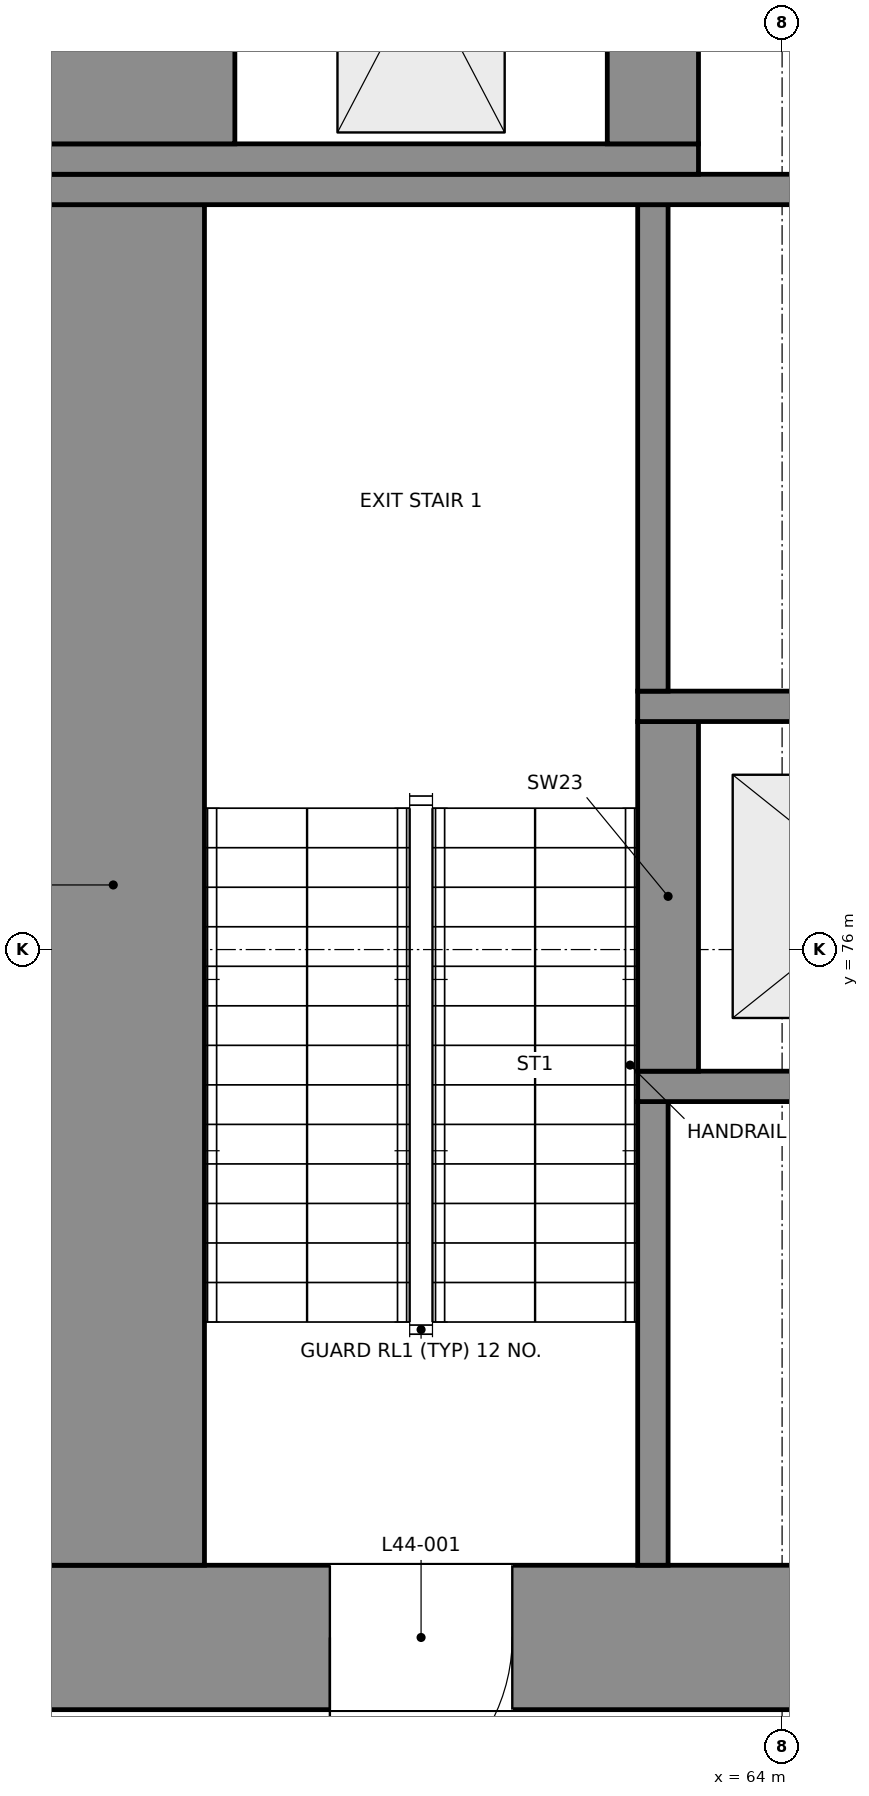
"""IFC4 building model, lengths in metres.
Left out: names, types, materials, properties, quantities, classifications, styles, units other than length and angle.
Written with IfcOpenShell. Run it as: python <this file> out.ifc"""

import sys

from ifc_helpers import new_model, si_unit, direction, frame, frame_2d, origin, place, context, subcontext, project, spatial, rectangle, extrude, element, fill, save


model = new_model("IFC4")
c1 = context("Model", 3, precision=1e-05, world=origin(), true_north=direction((0.0, 1.0)))
c2 = subcontext(c1, "Body", "Model", "MODEL_VIEW")
j1 = project(units=[si_unit("LENGTHUNIT", "METRE"), si_unit("PLANEANGLEUNIT", "RADIAN")], contexts=[c1])
p1 = place(None, origin())
s1 = spatial("IfcSite", under=j1, at=p1, CompositionType="ELEMENT")
p2 = place(p1, origin())
s2 = spatial("IfcBuilding", under=s1, at=p2, CompositionType="ELEMENT")
p3 = place(p2, frame((0.0, 0.0, 191.5)))
s3 = spatial("IfcBuildingStorey", under=s2, at=p3, CompositionType="ELEMENT", Elevation=191.5)
p4 = place(p3, frame((59.0, 71.475, 0.0), z_axis=(0.0, 0.0, 1.0), x_axis=(1.0, 0.0, 0.0)))
e1 = element("IfcWall", 1, at=p4, inside=s3, PredefinedType="SHEAR", context=c2, shape_type="SweptSolid", body=[
    extrude(rectangle(XDim=22.0, YDim=0.95, at=frame_2d((11.0, 0.0))), origin(), (0.0, 0.0, 1.0), 5.0),
])
p5 = place(p4, frame((2.025, 0.0, 0.0)))
e2 = element("IfcOpeningElement", 2, at=p5, cuts=e1, PredefinedType="OPENING", context=c2, shape_type="SweptSolid", body=[
    extrude(rectangle(XDim=1.2, YDim=2.1, at=frame_2d((0.6, 1.05))), frame((0.0, 0.485, 0.0), z_axis=(0.0, -1.0, 0.0), x_axis=(1.0, 0.0, 0.0)), (0.0, 0.0, 1.0), 0.97),
])
p6 = place(p4, frame((18.775, 0.0, 0.0)))
e3 = element("IfcOpeningElement", 3, at=p6, cuts=e1, PredefinedType="OPENING", context=c2, shape_type="SweptSolid", body=[
    extrude(rectangle(XDim=1.2, YDim=2.1, at=frame_2d((0.6, 1.05))), frame((0.0, 0.485, 0.0), z_axis=(0.0, -1.0, 0.0), x_axis=(1.0, 0.0, 0.0)), (0.0, 0.0, 1.0), 0.97),
])
p7 = place(p4, frame((10.0, 0.0, 0.0)))
e4 = element("IfcOpeningElement", 4, at=p7, cuts=e1, PredefinedType="OPENING", context=c2, shape_type="SweptSolid", body=[
    extrude(rectangle(XDim=2.0, YDim=2.1, at=frame_2d((1.0, 1.05))), frame((0.0, 0.485, 0.0), z_axis=(0.0, -1.0, 0.0), x_axis=(1.0, 0.0, 0.0)), (0.0, 0.0, 1.0), 0.97),
])
p8 = place(p3, frame((59.6, 71.95, 0.0), z_axis=(0.0, 0.0, 1.0), x_axis=(0.0, 1.0, 0.0)))
e5 = element("IfcWall", 5, at=p8, inside=s3, PredefinedType="SHEAR", context=c2, shape_type="SweptSolid", body=[
    extrude(rectangle(XDim=8.95, YDim=1.2, at=frame_2d((4.475, 0.0))), origin(), (0.0, 0.0, 1.0), 5.0),
])
p9 = place(p3, frame((63.15, 71.95, 0.0), z_axis=(0.0, 0.0, 1.0), x_axis=(0.0, 1.0, 0.0)))
e6 = element("IfcWall", 6, at=p9, inside=s3, PredefinedType="SHEAR", context=c2, shape_type="SweptSolid", body=[
    extrude(rectangle(XDim=3.05, YDim=0.2, at=frame_2d((1.525, 0.0))), origin(), (0.0, 0.0, 1.0), 5.0),
])
p10 = place(p3, frame((63.05, 75.1, 0.0), z_axis=(0.0, 0.0, 1.0), x_axis=(1.0, 0.0, 0.0)))
e7 = element("IfcWall", 7, at=p10, inside=s3, PredefinedType="SHEAR", context=c2, shape_type="SweptSolid", body=[
    extrude(rectangle(XDim=5.7, YDim=0.2, at=frame_2d((2.85, 0.0))), origin(), (0.0, 0.0, 1.0), 5.0),
])
p11 = place(p3, frame((63.25, 75.2, 0.0), z_axis=(0.0, 0.0, 1.0), x_axis=(0.0, 1.0, 0.0)))
e8 = element("IfcWall", 8, at=p11, inside=s3, PredefinedType="SHEAR", context=c2, shape_type="SweptSolid", body=[
    extrude(rectangle(XDim=2.3, YDim=0.4, at=frame_2d((1.15, 0.0))), origin(), (0.0, 0.0, 1.0), 5.0),
])
p12 = place(p3, frame((63.05, 77.6, 0.0), z_axis=(0.0, 0.0, 1.0), x_axis=(1.0, 0.0, 0.0)))
e9 = element("IfcWall", 9, at=p12, inside=s3, PredefinedType="SHEAR", context=c2, shape_type="SweptSolid", body=[
    extrude(rectangle(XDim=5.7, YDim=0.2, at=frame_2d((2.85, 0.0))), origin(), (0.0, 0.0, 1.0), 5.0),
])
p13 = place(p12, frame((1.075, 0.0, 0.0)))
e10 = element("IfcOpeningElement", 10, at=p13, cuts=e9, PredefinedType="OPENING", context=c2, shape_type="SweptSolid", body=[
    extrude(rectangle(XDim=1.1, YDim=2.1, at=frame_2d((0.55, 1.05))), frame((0.0, 0.11, 0.0), z_axis=(0.0, -1.0, 0.0), x_axis=(1.0, 0.0, 0.0)), (0.0, 0.0, 1.0), 0.22),
])
p14 = place(p12, frame((3.725, 0.0, 0.0)))
e11 = element("IfcOpeningElement", 11, at=p14, cuts=e9, PredefinedType="OPENING", context=c2, shape_type="SweptSolid", body=[
    extrude(rectangle(XDim=1.1, YDim=2.1, at=frame_2d((0.55, 1.05))), frame((0.0, 0.11, 0.0), z_axis=(0.0, -1.0, 0.0), x_axis=(1.0, 0.0, 0.0)), (0.0, 0.0, 1.0), 0.22),
])
p15 = place(p3, frame((63.15, 77.7, 0.0), z_axis=(0.0, 0.0, 1.0), x_axis=(0.0, 1.0, 0.0)))
e12 = element("IfcWall", 12, at=p15, inside=s3, PredefinedType="SHEAR", context=c2, shape_type="SweptSolid", body=[
    extrude(rectangle(XDim=3.2, YDim=0.2, at=frame_2d((1.6, 0.0))), origin(), (0.0, 0.0, 1.0), 5.0),
])
p16 = place(p3, frame((59.0, 81.0, 0.0), z_axis=(0.0, 0.0, 1.0), x_axis=(1.0, 0.0, 0.0)))
e13 = element("IfcWall", 13, at=p16, inside=s3, PredefinedType="SHEAR", context=c2, shape_type="SweptSolid", body=[
    extrude(rectangle(XDim=22.0, YDim=0.2, at=frame_2d((11.0, 0.0))), origin(), (0.0, 0.0, 1.0), 5.0),
])
p17 = place(p16, frame((11.015, 0.0, 0.0)))
e14 = element("IfcOpeningElement", 14, at=p17, cuts=e13, PredefinedType="OPENING", context=c2, shape_type="SweptSolid", body=[
    extrude(rectangle(XDim=0.9, YDim=2.1, at=frame_2d((0.45, 1.05))), frame((0.0, 0.11, 0.0), z_axis=(0.0, -1.0, 0.0), x_axis=(1.0, 0.0, 0.0)), (0.0, 0.0, 1.0), 0.22),
])
p18 = place(p16, frame((13.665, 0.0, 0.0)))
e15 = element("IfcOpeningElement", 15, at=p18, cuts=e13, PredefinedType="OPENING", context=c2, shape_type="SweptSolid", body=[
    extrude(rectangle(XDim=0.9, YDim=2.1, at=frame_2d((0.45, 1.05))), frame((0.0, 0.11, 0.0), z_axis=(0.0, -1.0, 0.0), x_axis=(1.0, 0.0, 0.0)), (0.0, 0.0, 1.0), 0.22),
])
p19 = place(p3, frame((59.0, 81.2, 0.0), z_axis=(0.0, 0.0, 1.0), x_axis=(1.0, 0.0, 0.0)))
e16 = element("IfcWall", 16, at=p19, inside=s3, PredefinedType="SHEAR", context=c2, shape_type="SweptSolid", body=[
    extrude(rectangle(XDim=4.45, YDim=0.2, at=frame_2d((2.225, 0.0))), origin(), (0.0, 0.0, 1.0), 5.0),
])
p20 = place(p3, frame((59.7, 81.3, 0.0), z_axis=(0.0, 0.0, 1.0), x_axis=(0.0, 1.0, 0.0)))
e17 = element("IfcWall", 17, at=p20, inside=s3, PredefinedType="SHEAR", context=c2, shape_type="SweptSolid", body=[
    extrude(rectangle(XDim=2.25, YDim=1.4, at=frame_2d((1.125, 0.0))), origin(), (0.0, 0.0, 1.0), 5.0),
])
p21 = place(p3, frame((63.15, 81.3, 0.0), z_axis=(0.0, 0.0, 1.0), x_axis=(0.0, 1.0, 0.0)))
e18 = element("IfcWall", 18, at=p21, inside=s3, PredefinedType="SHEAR", context=c2, shape_type="SweptSolid", body=[
    extrude(rectangle(XDim=2.25, YDim=0.6, at=frame_2d((1.125, 0.0))), origin(), (0.0, 0.0, 1.0), 5.0),
])
p22 = place(p5, frame((1.2, 0.0, 0.0), z_axis=(0.0, 0.0, 1.0), x_axis=(-1.0, 0.0, 0.0)))
e19 = element("IfcDoor", 19, at=p22, inside=s3, OperationType="SINGLE_SWING_RIGHT", PredefinedType="DOOR", context=c2, shape_type="SweptSolid", body=[
    extrude(rectangle(XDim=1.2, YDim=2.1, at=frame_2d((0.6, 1.05))), frame((0.0, 0.025, 0.0), z_axis=(0.0, -1.0, 0.0), x_axis=(1.0, 0.0, 0.0)), (0.0, 0.0, 1.0), 0.05),
])
fill(e2, e19)
save(model, sys.argv[1])
